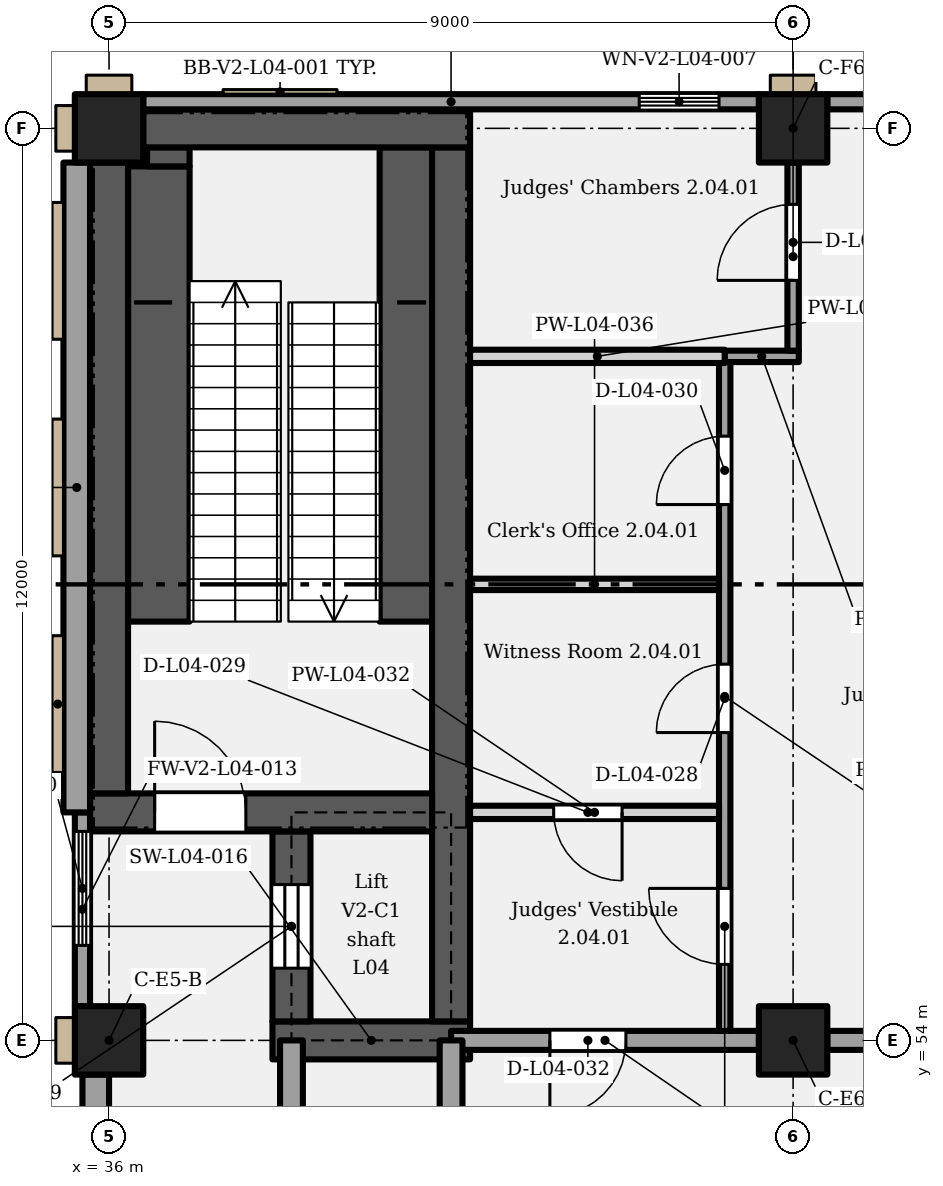
"""IFC4 building model, lengths in metres.
Left out: names, types, materials, properties, quantities, classifications, styles, units other than length and angle.
Written with IfcOpenShell. Run it as: python <this file> out.ifc"""

import sys

from ifc_helpers import new_model, si_unit, direction, frame, frame_2d, origin, origin_2d, place, context, subcontext, project, spatial, rectangle, extrude, element, fill, save


model = new_model("IFC4")
c1 = context("Model", 3, precision=1e-05, world=origin(), true_north=direction((0.0, 1.0)))
c2 = subcontext(c1, "Body", "Model", "MODEL_VIEW")
j1 = project(units=[si_unit("LENGTHUNIT", "METRE"), si_unit("PLANEANGLEUNIT", "RADIAN")], contexts=[c1])
p1 = place(None, origin())
s1 = spatial("IfcSite", under=j1, at=p1, CompositionType="ELEMENT")
p2 = place(p1, origin())
s2 = spatial("IfcBuilding", under=s1, at=p2, CompositionType="ELEMENT")
p3 = place(p2, frame((0.0, 0.0, 22.8)))
s3 = spatial("IfcBuildingStorey", under=s2, at=p3, CompositionType="ELEMENT", Elevation=22.8)
for number, where, z_axis, x_axis in (
    (1, (36.0, 54.0, 0.0), (0.0, 0.0, 1.0), (1.0, 0.0, 0.0)),
    (2, (45.0, 54.0, 0.0), (0.0, 0.0, 1.0), (1.0, 0.0, 0.0)),
    (3, (36.0, 66.0, 0.0), (0.0, 0.0, 1.0), (1.0, 0.0, 0.0)),
    (4, (45.0, 66.0, 0.0), (0.0, 0.0, 1.0), (1.0, 0.0, 0.0)),
):
    element("IfcColumn", number, at=place(p3, frame(where, z_axis=z_axis, x_axis=x_axis)), inside=s3, PredefinedType="COLUMN", context=c2, shape_type="SweptSolid", body=[
        extrude(rectangle(XDim=0.9, YDim=0.9, at=origin_2d()), origin(), (0.0, 0.0, 1.0), 5.4),
    ])
p4 = place(p3, frame((38.15, 54.0, 0.0), z_axis=(0.0, 0.0, 1.0), x_axis=(1.0, 0.0, 0.0)))
e5 = element("IfcWall", 5, at=p4, inside=s3, PredefinedType="SHEAR", context=c2, shape_type="SweptSolid", body=[
    extrude(rectangle(XDim=2.6, YDim=0.5, at=frame_2d((1.3, 0.0))), origin(), (0.0, 0.0, 1.0), 5.15),
])
p5 = place(p3, frame((38.4, 54.25, 0.0), z_axis=(0.0, 0.0, 1.0), x_axis=(0.0, 1.0, 0.0)))
e6 = element("IfcWall", 6, at=p5, inside=s3, PredefinedType="SHEAR", context=c2, shape_type="SweptSolid", body=[
    extrude(rectangle(XDim=2.5, YDim=0.5, at=frame_2d((1.25, 0.0))), origin(), (0.0, 0.0, 1.0), 5.15),
])
p6 = place(p5, frame((0.7, 0.0, 0.0)))
e7 = element("IfcOpeningElement", 7, at=p6, cuts=e6, PredefinedType="OPENING", context=c2, shape_type="SweptSolid", body=[
    extrude(rectangle(XDim=1.1, YDim=2.1, at=frame_2d((0.55, 1.05))), frame((0.0, 0.26, 0.0), z_axis=(0.0, -1.0, 0.0), x_axis=(1.0, 0.0, 0.0)), (0.0, 0.0, 1.0), 0.52),
])
p7 = place(p3, frame((40.5, 54.25, 0.0), z_axis=(0.0, 0.0, 1.0), x_axis=(0.0, 1.0, 0.0)))
e8 = element("IfcWall", 8, at=p7, inside=s3, PredefinedType="SHEAR", context=c2, shape_type="SweptSolid", body=[
    extrude(rectangle(XDim=11.5, YDim=0.5, at=frame_2d((5.75, 0.0))), origin(), (0.0, 0.0, 1.0), 5.15),
])
p8 = place(p3, frame((35.75, 57.0, 0.0), z_axis=(0.0, 0.0, 1.0), x_axis=(1.0, 0.0, 0.0)))
e9 = element("IfcWall", 9, at=p8, inside=s3, PredefinedType="SHEAR", context=c2, shape_type="SweptSolid", body=[
    extrude(rectangle(XDim=4.5, YDim=0.5, at=frame_2d((2.25, 0.0))), origin(), (0.0, 0.0, 1.0), 5.15),
])
p9 = place(p8, frame((0.85, 0.0, 0.0)))
e10 = element("IfcOpeningElement", 10, at=p9, cuts=e9, PredefinedType="OPENING", context=c2, shape_type="SweptSolid", body=[
    extrude(rectangle(XDim=1.2, YDim=2.1, at=frame_2d((0.6, 1.05))), frame((0.0, 0.26, 0.0), z_axis=(0.0, -1.0, 0.0), x_axis=(1.0, 0.0, 0.0)), (0.0, 0.0, 1.0), 0.52),
])
p10 = place(p3, frame((36.0, 57.25, 0.0), z_axis=(0.0, 0.0, 1.0), x_axis=(0.0, 1.0, 0.0)))
e11 = element("IfcWall", 11, at=p10, inside=s3, PredefinedType="SHEAR", context=c2, shape_type="SweptSolid", body=[
    extrude(rectangle(XDim=8.3, YDim=0.5, at=frame_2d((4.15, 0.0))), origin(), (0.0, 0.0, 1.0), 5.15),
])
p11 = place(p3, frame((36.45, 66.0, 0.0), z_axis=(0.0, 0.0, 1.0), x_axis=(1.0, 0.0, 0.0)))
e12 = element("IfcWall", 12, at=p11, inside=s3, PredefinedType="SHEAR", context=c2, shape_type="SweptSolid", body=[
    extrude(rectangle(XDim=4.3, YDim=0.5, at=frame_2d((2.15, 0.0))), origin(), (0.0, 0.0, 1.0), 5.15),
])
p12 = place(p3, frame((36.45, 66.35, 0.0), z_axis=(0.0, 0.0, 1.0), x_axis=(1.0, 0.0, 0.0)))
e13 = element("IfcWall", 13, at=p12, inside=s3, PredefinedType="SOLIDWALL", context=c2, shape_type="SweptSolid", body=[
    extrude(rectangle(XDim=8.1, YDim=0.2, at=frame_2d((4.05, 0.0))), origin(), (0.0, 0.0, 1.0), 5.15),
])
p13 = place(p12, frame((6.525, 0.0, 1.05)))
e14 = element("IfcOpeningElement", 14, at=p13, cuts=e13, PredefinedType="OPENING", context=c2, shape_type="SweptSolid", body=[
    extrude(rectangle(XDim=1.05, YDim=2.4, at=frame_2d((0.525, 1.2))), frame((0.0, 0.11, 0.0), z_axis=(0.0, -1.0, 0.0), x_axis=(1.0, 0.0, 0.0)), (0.0, 0.0, 1.0), 0.22),
])
p14 = place(p3, frame((45.45, 66.35, 0.0), z_axis=(0.0, 0.0, 1.0), x_axis=(1.0, 0.0, 0.0)))
e15 = element("IfcWall", 15, at=p14, inside=s3, PredefinedType="SOLIDWALL", context=c2, shape_type="SweptSolid", body=[
    extrude(rectangle(XDim=8.1, YDim=0.2, at=frame_2d((4.05, 0.0))), origin(), (0.0, 0.0, 1.0), 5.15),
])
p15 = place(p14, frame((1.05, 0.0, 1.05)))
e16 = element("IfcOpeningElement", 16, at=p15, cuts=e15, PredefinedType="OPENING", context=c2, shape_type="SweptSolid", body=[
    extrude(rectangle(XDim=1.5, YDim=3.5, at=frame_2d((0.75, 1.75))), frame((0.0, 0.11, 0.0), z_axis=(0.0, -1.0, 0.0), x_axis=(1.0, 0.0, 0.0)), (0.0, 0.0, 1.0), 0.22),
])
p16 = place(p3, frame((35.825, 43.5, 0.0), z_axis=(0.0, 0.0, 1.0), x_axis=(0.0, 1.0, 0.0)))
e17 = element("IfcWall", 17, at=p16, inside=s3, PredefinedType="SOLIDWALL", context=c2, shape_type="SweptSolid", body=[
    extrude(rectangle(XDim=10.05, YDim=0.35, at=frame_2d((5.025, 0.0))), origin(), (0.0, 0.0, 1.0), 5.15),
])
p17 = place(p16, frame((1.5, 0.0, 1.05)))
e18 = element("IfcOpeningElement", 18, at=p17, cuts=e17, PredefinedType="OPENING", context=c2, shape_type="SweptSolid", body=[
    extrude(rectangle(XDim=1.5, YDim=3.5, at=frame_2d((0.75, 1.75))), frame((0.0, 0.185, 0.0), z_axis=(0.0, -1.0, 0.0), x_axis=(1.0, 0.0, 0.0)), (0.0, 0.0, 1.0), 0.37),
])
p18 = place(p16, frame((4.8, 0.0, 1.05)))
e19 = element("IfcOpeningElement", 19, at=p18, cuts=e17, PredefinedType="OPENING", context=c2, shape_type="SweptSolid", body=[
    extrude(rectangle(XDim=1.5, YDim=3.5, at=frame_2d((0.75, 1.75))), frame((0.0, 0.185, 0.0), z_axis=(0.0, -1.0, 0.0), x_axis=(1.0, 0.0, 0.0)), (0.0, 0.0, 1.0), 0.37),
])
p19 = place(p16, frame((8.1, 0.0, 1.05)))
e20 = element("IfcOpeningElement", 20, at=p19, cuts=e17, PredefinedType="OPENING", context=c2, shape_type="SweptSolid", body=[
    extrude(rectangle(XDim=1.5, YDim=3.5, at=frame_2d((0.75, 1.75))), frame((0.0, 0.185, 0.0), z_axis=(0.0, -1.0, 0.0), x_axis=(1.0, 0.0, 0.0)), (0.0, 0.0, 1.0), 0.37),
])
p20 = place(p3, frame((35.65, 54.45, 0.0), z_axis=(0.0, 0.0, 1.0), x_axis=(0.0, 1.0, 0.0)))
e21 = element("IfcWall", 21, at=p20, inside=s3, PredefinedType="SOLIDWALL", context=c2, shape_type="SweptSolid", body=[
    extrude(rectangle(XDim=2.55, YDim=0.2, at=frame_2d((1.275, 0.0))), origin(), (0.0, 0.0, 1.0), 5.15),
])
p21 = place(p20, frame((0.8, 0.0, 1.05)))
e22 = element("IfcOpeningElement", 22, at=p21, cuts=e21, PredefinedType="OPENING", context=c2, shape_type="SweptSolid", body=[
    extrude(rectangle(XDim=1.5, YDim=3.5, at=frame_2d((0.75, 1.75))), frame((0.0, 0.11, 0.0), z_axis=(0.0, -1.0, 0.0), x_axis=(1.0, 0.0, 0.0)), (0.0, 0.0, 1.0), 0.22),
])
p22 = place(p3, frame((35.575, 57.0, 0.0), z_axis=(0.0, 0.0, 1.0), x_axis=(0.0, 1.0, 0.0)))
e23 = element("IfcWall", 23, at=p22, inside=s3, PredefinedType="SOLIDWALL", context=c2, shape_type="SweptSolid", body=[
    extrude(rectangle(XDim=8.55, YDim=0.35, at=frame_2d((4.275, 0.0))), origin(), (0.0, 0.0, 1.0), 5.15),
])
p23 = place(p3, frame((40.5, 54.0, 0.0), z_axis=(0.0, 0.0, 1.0), x_axis=(1.0, 0.0, 0.0)))
e24 = element("IfcWall", 24, at=p23, inside=s3, PredefinedType="PARTITIONING", context=c2, shape_type="SweptSolid", body=[
    extrude(rectangle(XDim=4.05, YDim=0.25, at=frame_2d((2.025, 0.0))), origin(), (0.0, 0.0, 1.0), 4.4),
])
p24 = place(p23, frame((2.3, 0.0, 0.0), z_axis=(0.0, 0.0, 1.0), x_axis=(-1.0, 0.0, 0.0)))
e25 = element("IfcOpeningElement", 25, at=p24, cuts=e24, PredefinedType="OPENING", context=c2, shape_type="SweptSolid", body=[
    extrude(rectangle(XDim=1.0, YDim=2.1, at=frame_2d((0.5, 1.05))), frame((0.0, 0.135, 0.0), z_axis=(0.0, -1.0, 0.0), x_axis=(1.0, 0.0, 0.0)), (0.0, 0.0, 1.0), 0.27),
])
p25 = place(p3, frame((45.45, 54.0, 0.0), z_axis=(0.0, 0.0, 1.0), x_axis=(1.0, 0.0, 0.0)))
e26 = element("IfcWall", 26, at=p25, inside=s3, PredefinedType="PARTITIONING", context=c2, shape_type="SweptSolid", body=[
    extrude(rectangle(XDim=1.05, YDim=0.25, at=frame_2d((0.525, 0.0))), origin(), (0.0, 0.0, 1.0), 4.4),
])
p26 = place(p3, frame((40.75, 57.0, 0.0), z_axis=(0.0, 0.0, 1.0), x_axis=(1.0, 0.0, 0.0)))
e27 = element("IfcWall", 27, at=p26, inside=s3, PredefinedType="PARTITIONING", context=c2, shape_type="SweptSolid", body=[
    extrude(rectangle(XDim=3.275, YDim=0.175, at=frame_2d((1.637, 0.0))), origin(), (0.0, 0.0, 1.0), 5.15),
])
p27 = place(p26, frame((2.0, 0.0, 0.0), z_axis=(0.0, 0.0, 1.0), x_axis=(-1.0, 0.0, 0.0)))
e28 = element("IfcOpeningElement", 28, at=p27, cuts=e27, PredefinedType="OPENING", context=c2, shape_type="SweptSolid", body=[
    extrude(rectangle(XDim=0.9, YDim=2.1, at=frame_2d((0.45, 1.05))), frame((0.0, 0.097, 0.0), z_axis=(0.0, -1.0, 0.0), x_axis=(1.0, 0.0, 0.0)), (0.0, 0.0, 1.0), 0.195),
])
p28 = place(p3, frame((40.75, 60.0, 0.0), z_axis=(0.0, 0.0, 1.0), x_axis=(1.0, 0.0, 0.0)))
e29 = element("IfcWall", 29, at=p28, inside=s3, PredefinedType="PARTITIONING", context=c2, shape_type="SweptSolid", body=[
    extrude(rectangle(XDim=3.275, YDim=0.15, at=frame_2d((1.637, 0.0))), origin(), (0.0, 0.0, 1.0), 5.15),
])
p29 = place(p3, frame((40.75, 63.0, 0.0), z_axis=(0.0, 0.0, 1.0), x_axis=(1.0, 0.0, 0.0)))
e30 = element("IfcWall", 30, at=p29, inside=s3, PredefinedType="PARTITIONING", context=c2, shape_type="SweptSolid", body=[
    extrude(rectangle(XDim=3.35, YDim=0.175, at=frame_2d((1.675, 0.0))), origin(), (0.0, 0.0, 1.0), 5.15),
])
p30 = place(p3, frame((44.1, 63.0, 0.0), z_axis=(0.0, 0.0, 1.0), x_axis=(1.0, 0.0, 0.0)))
e31 = element("IfcWall", 31, at=p30, inside=s3, PredefinedType="PARTITIONING", context=c2, shape_type="SweptSolid", body=[
    extrude(rectangle(XDim=0.975, YDim=0.15, at=frame_2d((0.487, 0.0))), origin(), (0.0, 0.0, 1.0), 5.15),
])
p31 = place(p3, frame((38.4, 43.65, 0.0), z_axis=(0.0, 0.0, 1.0), x_axis=(0.0, 1.0, 0.0)))
e32 = element("IfcWall", 32, at=p31, inside=s3, PredefinedType="PARTITIONING", context=c2, shape_type="SweptSolid", body=[
    extrude(rectangle(XDim=10.35, YDim=0.3, at=frame_2d((5.175, 0.0))), origin(), (0.0, 0.0, 1.0), 5.15),
])
p32 = place(p31, frame((1.55, 0.0, 0.0), z_axis=(0.0, 0.0, 1.0), x_axis=(-1.0, 0.0, 0.0)))
e33 = element("IfcOpeningElement", 33, at=p32, cuts=e32, PredefinedType="OPENING", context=c2, shape_type="SweptSolid", body=[
    extrude(rectangle(XDim=0.9, YDim=2.0, at=frame_2d((0.45, 1.0))), frame((0.0, 0.16, 0.0), z_axis=(0.0, -1.0, 0.0), x_axis=(1.0, 0.0, 0.0)), (0.0, 0.0, 1.0), 0.32),
])
p33 = place(p31, frame((4.05, 0.0, 0.0), z_axis=(0.0, 0.0, 1.0), x_axis=(-1.0, 0.0, 0.0)))
e34 = element("IfcOpeningElement", 34, at=p33, cuts=e32, PredefinedType="OPENING", context=c2, shape_type="SweptSolid", body=[
    extrude(rectangle(XDim=0.9, YDim=2.0, at=frame_2d((0.45, 1.0))), frame((0.0, 0.16, 0.0), z_axis=(0.0, -1.0, 0.0), x_axis=(1.0, 0.0, 0.0)), (0.0, 0.0, 1.0), 0.32),
])
p34 = place(p31, frame((6.55, 0.0, 0.0), z_axis=(0.0, 0.0, 1.0), x_axis=(-1.0, 0.0, 0.0)))
e35 = element("IfcOpeningElement", 35, at=p34, cuts=e32, PredefinedType="OPENING", context=c2, shape_type="SweptSolid", body=[
    extrude(rectangle(XDim=0.9, YDim=2.0, at=frame_2d((0.45, 1.0))), frame((0.0, 0.16, 0.0), z_axis=(0.0, -1.0, 0.0), x_axis=(1.0, 0.0, 0.0)), (0.0, 0.0, 1.0), 0.32),
])
p35 = place(p31, frame((9.3, 0.0, 0.0), z_axis=(0.0, 0.0, 1.0), x_axis=(-1.0, 0.0, 0.0)))
e36 = element("IfcOpeningElement", 36, at=p35, cuts=e32, PredefinedType="OPENING", context=c2, shape_type="SweptSolid", body=[
    extrude(rectangle(XDim=0.9, YDim=2.0, at=frame_2d((0.45, 1.0))), frame((0.0, 0.16, 0.0), z_axis=(0.0, -1.0, 0.0), x_axis=(1.0, 0.0, 0.0)), (0.0, 0.0, 1.0), 0.32),
])
p36 = place(p3, frame((40.5, 43.65, 0.0), z_axis=(0.0, 0.0, 1.0), x_axis=(0.0, 1.0, 0.0)))
e37 = element("IfcWall", 37, at=p36, inside=s3, PredefinedType="PARTITIONING", context=c2, shape_type="SweptSolid", body=[
    extrude(rectangle(XDim=10.35, YDim=0.3, at=frame_2d((5.175, 0.0))), origin(), (0.0, 0.0, 1.0), 5.15),
])
p37 = place(p36, frame((9.35, 0.0, 0.0), z_axis=(0.0, 0.0, 1.0), x_axis=(-1.0, 0.0, 0.0)))
e38 = element("IfcOpeningElement", 38, at=p37, cuts=e37, PredefinedType="OPENING", context=c2, shape_type="SweptSolid", body=[
    extrude(rectangle(XDim=1.0, YDim=2.0, at=frame_2d((0.5, 1.0))), frame((0.0, 0.16, 0.0), z_axis=(0.0, -1.0, 0.0), x_axis=(1.0, 0.0, 0.0)), (0.0, 0.0, 1.0), 0.32),
])
p38 = place(p3, frame((44.1, 54.125, 0.0), z_axis=(0.0, 0.0, 1.0), x_axis=(0.0, 1.0, 0.0)))
e39 = element("IfcWall", 39, at=p38, inside=s3, PredefinedType="PARTITIONING", context=c2, shape_type="SweptSolid", body=[
    extrude(rectangle(XDim=8.8, YDim=0.15, at=frame_2d((4.4, 0.0))), origin(), (0.0, 0.0, 1.0), 5.15),
])
p39 = place(p38, frame((0.875, 0.0, 0.0)))
e40 = element("IfcOpeningElement", 40, at=p39, cuts=e39, PredefinedType="OPENING", context=c2, shape_type="SweptSolid", body=[
    extrude(rectangle(XDim=1.0, YDim=2.1, at=frame_2d((0.5, 1.05))), frame((0.0, 0.085, 0.0), z_axis=(0.0, -1.0, 0.0), x_axis=(1.0, 0.0, 0.0)), (0.0, 0.0, 1.0), 0.17),
])
p40 = place(p38, frame((3.925, 0.0, 0.0)))
e41 = element("IfcOpeningElement", 41, at=p40, cuts=e39, PredefinedType="OPENING", context=c2, shape_type="SweptSolid", body=[
    extrude(rectangle(XDim=0.9, YDim=2.1, at=frame_2d((0.45, 1.05))), frame((0.0, 0.085, 0.0), z_axis=(0.0, -1.0, 0.0), x_axis=(1.0, 0.0, 0.0)), (0.0, 0.0, 1.0), 0.17),
])
p41 = place(p38, frame((6.925, 0.0, 0.0)))
e42 = element("IfcOpeningElement", 42, at=p41, cuts=e39, PredefinedType="OPENING", context=c2, shape_type="SweptSolid", body=[
    extrude(rectangle(XDim=0.9, YDim=2.1, at=frame_2d((0.45, 1.05))), frame((0.0, 0.085, 0.0), z_axis=(0.0, -1.0, 0.0), x_axis=(1.0, 0.0, 0.0)), (0.0, 0.0, 1.0), 0.17),
])
p42 = place(p3, frame((45.0, 63.075, 0.0), z_axis=(0.0, 0.0, 1.0), x_axis=(0.0, 1.0, 0.0)))
e43 = element("IfcWall", 43, at=p42, inside=s3, PredefinedType="PARTITIONING", context=c2, shape_type="SweptSolid", body=[
    extrude(rectangle(XDim=2.475, YDim=0.15, at=frame_2d((1.238, 0.0))), origin(), (0.0, 0.0, 1.0), 4.4),
])
p43 = place(p42, frame((0.925, 0.0, 0.0)))
e44 = element("IfcOpeningElement", 44, at=p43, cuts=e43, PredefinedType="OPENING", context=c2, shape_type="SweptSolid", body=[
    extrude(rectangle(XDim=1.0, YDim=2.1, at=frame_2d((0.5, 1.05))), frame((0.0, 0.085, 0.0), z_axis=(0.0, -1.0, 0.0), x_axis=(1.0, 0.0, 0.0)), (0.0, 0.0, 1.0), 0.17),
])
p44 = place(p3, frame((36.655, 59.51, 0.0), z_axis=(0.0, 0.0, 1.0), x_axis=(0.0, 1.0, 0.0)))
e45 = element("IfcWall", 45, at=p44, inside=s3, PredefinedType="SHEAR", context=c2, shape_type="SweptSolid", body=[
    extrude(rectangle(XDim=5.99, YDim=0.81, at=frame_2d((2.995, 0.0))), origin(), (0.0, 0.0, 1.0), 2.587),
])
p45 = place(p3, frame((36.78, 65.5, 0.0), z_axis=(0.0, 0.0, 1.0), x_axis=(0.0, 1.0, 0.0)))
e46 = element("IfcWall", 46, at=p45, inside=s3, PredefinedType="SHEAR", context=c2, shape_type="SweptSolid", body=[
    extrude(rectangle(XDim=0.25, YDim=0.56, at=frame_2d((0.125, 0.0))), origin(), (0.0, 0.0, 1.0), 2.587),
])
p46 = place(p3, frame((39.905, 59.51, 0.0), z_axis=(0.0, 0.0, 1.0), x_axis=(0.0, 1.0, 0.0)))
e47 = element("IfcWall", 47, at=p46, inside=s3, PredefinedType="SHEAR", context=c2, shape_type="SweptSolid", body=[
    extrude(rectangle(XDim=6.24, YDim=0.69, at=frame_2d((3.12, 0.0))), origin(), (0.0, 0.0, 1.0), 2.587),
])
p47 = place(p13, origin())
e48 = element("IfcWindow", 48, at=p47, inside=s3, PartitioningType="SINGLE_PANEL", PredefinedType="WINDOW", context=c2, shape_type="SweptSolid", body=[
    extrude(rectangle(XDim=1.05, YDim=2.4, at=frame_2d((0.525, 1.2))), frame((0.0, 0.03, 0.0), z_axis=(0.0, -1.0, 0.0), x_axis=(1.0, 0.0, 0.0)), (0.0, 0.0, 1.0), 0.06),
])
fill(e14, e48)
p48 = place(p21, origin())
e49 = element("IfcWindow", 49, at=p48, inside=s3, PartitioningType="SINGLE_PANEL", PredefinedType="WINDOW", context=c2, shape_type="SweptSolid", body=[
    extrude(rectangle(XDim=1.5, YDim=3.5, at=frame_2d((0.75, 1.75))), frame((0.0, 0.03, 0.0), z_axis=(0.0, -1.0, 0.0), x_axis=(1.0, 0.0, 0.0)), (0.0, 0.0, 1.0), 0.06),
])
fill(e22, e49)
p49 = place(p6, origin())
e50 = element("IfcDoor", 50, at=p49, inside=s3, OperationType="SLIDING_TO_LEFT", PredefinedType="DOOR", context=c2, shape_type="SweptSolid", body=[
    extrude(rectangle(XDim=1.1, YDim=2.1, at=frame_2d((0.55, 1.05))), frame((0.0, 0.025, 0.0), z_axis=(0.0, -1.0, 0.0), x_axis=(1.0, 0.0, 0.0)), (0.0, 0.0, 1.0), 0.05),
])
fill(e7, e50)
p50 = place(p9, origin())
e51 = element("IfcDoor", 51, at=p50, inside=s3, OperationType="SINGLE_SWING_LEFT", PredefinedType="DOOR", context=c2, shape_type="SweptSolid", body=[
    extrude(rectangle(XDim=1.2, YDim=2.1, at=frame_2d((0.6, 1.05))), frame((0.0, 0.025, 0.0), z_axis=(0.0, -1.0, 0.0), x_axis=(1.0, 0.0, 0.0)), (0.0, 0.0, 1.0), 0.05),
])
fill(e10, e51)
p51 = place(p39, origin())
e52 = element("IfcDoor", 52, at=p51, inside=s3, OperationType="SINGLE_SWING_RIGHT", PredefinedType="DOOR", context=c2, shape_type="SweptSolid", body=[
    extrude(rectangle(XDim=1.0, YDim=2.1, at=frame_2d((0.5, 1.05))), frame((0.0, 0.025, 0.0), z_axis=(0.0, -1.0, 0.0), x_axis=(1.0, 0.0, 0.0)), (0.0, 0.0, 1.0), 0.05),
])
fill(e40, e52)
p52 = place(p40, origin())
e53 = element("IfcDoor", 53, at=p52, inside=s3, OperationType="SINGLE_SWING_LEFT", PredefinedType="DOOR", context=c2, shape_type="SweptSolid", body=[
    extrude(rectangle(XDim=0.9, YDim=2.1, at=frame_2d((0.45, 1.05))), frame((0.0, 0.025, 0.0), z_axis=(0.0, -1.0, 0.0), x_axis=(1.0, 0.0, 0.0)), (0.0, 0.0, 1.0), 0.05),
])
fill(e41, e53)
p53 = place(p27, origin())
e54 = element("IfcDoor", 54, at=p53, inside=s3, OperationType="SINGLE_SWING_LEFT", PredefinedType="DOOR", context=c2, shape_type="SweptSolid", body=[
    extrude(rectangle(XDim=0.9, YDim=2.1, at=frame_2d((0.45, 1.05))), frame((0.0, 0.025, 0.0), z_axis=(0.0, -1.0, 0.0), x_axis=(1.0, 0.0, 0.0)), (0.0, 0.0, 1.0), 0.05),
])
fill(e28, e54)
p54 = place(p41, origin())
e55 = element("IfcDoor", 55, at=p54, inside=s3, OperationType="SINGLE_SWING_LEFT", PredefinedType="DOOR", context=c2, shape_type="SweptSolid", body=[
    extrude(rectangle(XDim=0.9, YDim=2.1, at=frame_2d((0.45, 1.05))), frame((0.0, 0.025, 0.0), z_axis=(0.0, -1.0, 0.0), x_axis=(1.0, 0.0, 0.0)), (0.0, 0.0, 1.0), 0.05),
])
fill(e42, e55)
p55 = place(p43, origin())
e56 = element("IfcDoor", 56, at=p55, inside=s3, OperationType="SINGLE_SWING_LEFT", PredefinedType="DOOR", context=c2, shape_type="SweptSolid", body=[
    extrude(rectangle(XDim=1.0, YDim=2.1, at=frame_2d((0.5, 1.05))), frame((0.0, 0.025, 0.0), z_axis=(0.0, -1.0, 0.0), x_axis=(1.0, 0.0, 0.0)), (0.0, 0.0, 1.0), 0.05),
])
fill(e44, e56)
p56 = place(p24, origin())
e57 = element("IfcDoor", 57, at=p56, inside=s3, OperationType="SINGLE_SWING_RIGHT", PredefinedType="DOOR", context=c2, shape_type="SweptSolid", body=[
    extrude(rectangle(XDim=1.0, YDim=2.1, at=frame_2d((0.5, 1.05))), frame((0.0, 0.025, 0.0), z_axis=(0.0, -1.0, 0.0), x_axis=(1.0, 0.0, 0.0)), (0.0, 0.0, 1.0), 0.05),
])
fill(e25, e57)
save(model, sys.argv[1])
